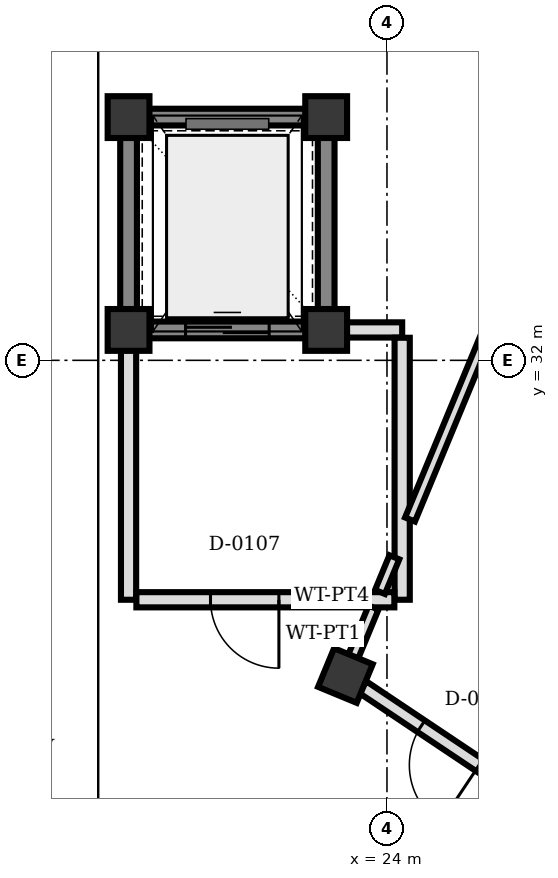
"""IFC4 building model, lengths in metres.
Left out: names, types, materials, properties, quantities, classifications, styles, units other than length and angle.
Written with IfcOpenShell. Run it as: python <this file> out.ifc"""

import sys

from ifc_helpers import new_model, si_unit, direction, frame, frame_2d, origin, origin_2d, place, context, subcontext, project, spatial, rectangle, extrude, element, fill, save


model = new_model("IFC4")
c1 = context("Model", 3, precision=1e-05, world=origin(), true_north=direction((0.0, 1.0)))
c2 = subcontext(c1, "Body", "Model", "MODEL_VIEW")
j1 = project(units=[si_unit("LENGTHUNIT", "METRE"), si_unit("PLANEANGLEUNIT", "RADIAN")], contexts=[c1])
p1 = place(None, origin())
s1 = spatial("IfcSite", under=j1, at=p1, CompositionType="ELEMENT")
p2 = place(p1, origin())
s2 = spatial("IfcBuilding", under=s1, at=p2, CompositionType="ELEMENT")
p3 = place(p2, frame((0.0, 0.0, 8.5)))
s3 = spatial("IfcBuildingStorey", under=s2, at=p3, CompositionType="ELEMENT", Elevation=8.5)
for number, where, z_axis, x_axis in (
    (1, (20.6, 32.4, 0.0), (0.0, 0.0, 1.0), (1.0, 0.0, 0.0)),
    (2, (23.2, 32.4, 0.0), (0.0, 0.0, 1.0), (1.0, 0.0, 0.0)),
    (3, (23.2, 35.2, 0.0), (0.0, 0.0, 1.0), (1.0, 0.0, 0.0)),
    (4, (20.6, 35.2, 0.0), (0.0, 0.0, 1.0), (1.0, 0.0, 0.0)),
    (5, (23.453, 27.853, 0.0), (0.0, 0.0, 1.0), (0.383, 0.924, 0.0)),
):
    element("IfcColumn", number, at=place(p3, frame(where, z_axis=z_axis, x_axis=x_axis)), inside=s3, PredefinedType="COLUMN", context=c2, shape_type="SweptSolid", body=[
        extrude(rectangle(XDim=0.55, YDim=0.55, at=origin_2d()), origin(), (0.0, 0.0, 1.0), 4.0),
    ])
p4 = place(p3, frame((20.867, 32.4, 0.0), z_axis=(0.0, 0.0, 1.0), x_axis=(1.0, 0.0, 0.0)))
e6 = element("IfcWall", 6, at=p4, inside=s3, PredefinedType="SHEAR", context=c2, shape_type="SweptSolid", body=[
    extrude(rectangle(XDim=2.066, YDim=0.22, at=frame_2d((1.033, 0.0))), origin(), (0.0, 0.0, 1.0), 3.74),
])
p5 = place(p4, frame((0.483, 0.0, 0.0)))
e7 = element("IfcOpeningElement", 7, at=p5, cuts=e6, PredefinedType="OPENING", context=c2, shape_type="SweptSolid", body=[
    extrude(rectangle(XDim=1.1, YDim=2.15, at=frame_2d((0.55, 1.075))), frame((0.0, 0.12, 0.0), z_axis=(0.0, -1.0, 0.0), x_axis=(1.0, 0.0, 0.0)), (0.0, 0.0, 1.0), 0.24),
])
p6 = place(p3, frame((23.2, 32.667, 0.0), z_axis=(0.0, 0.0, 1.0), x_axis=(0.0, 1.0, 0.0)))
e8 = element("IfcWall", 8, at=p6, inside=s3, PredefinedType="SHEAR", context=c2, shape_type="SweptSolid", body=[
    extrude(rectangle(XDim=2.266, YDim=0.22, at=frame_2d((1.133, 0.0))), origin(), (0.0, 0.0, 1.0), 3.74),
])
p7 = place(p3, frame((22.933, 35.2, 0.0), z_axis=(0.0, 0.0, 1.0), x_axis=(-1.0, 0.0, 0.0)))
e9 = element("IfcWall", 9, at=p7, inside=s3, PredefinedType="SHEAR", context=c2, shape_type="SweptSolid", body=[
    extrude(rectangle(XDim=2.066, YDim=0.22, at=frame_2d((1.033, 0.0))), origin(), (0.0, 0.0, 1.0), 3.74),
])
p8 = place(p3, frame((20.6, 34.933, 0.0), z_axis=(0.0, 0.0, 1.0), x_axis=(0.0, -1.0, 0.0)))
e10 = element("IfcWall", 10, at=p8, inside=s3, PredefinedType="SHEAR", context=c2, shape_type="SweptSolid", body=[
    extrude(rectangle(XDim=2.266, YDim=0.22, at=frame_2d((1.133, 0.0))), origin(), (0.0, 0.0, 1.0), 3.74),
])
p9 = place(p3, frame((23.467, 32.4, 0.0), z_axis=(0.0, 0.0, 1.0), x_axis=(1.0, 0.0, 0.0)))
e11 = element("IfcWall", 11, at=p9, inside=s3, PredefinedType="PARTITIONING", context=c2, shape_type="SweptSolid", body=[
    extrude(rectangle(XDim=0.733, YDim=0.2, at=frame_2d((0.366, 0.0))), origin(), (0.0, 0.0, 1.0), 3.7),
])
p10 = place(p3, frame((20.6, 28.85, 0.0), z_axis=(0.0, 0.0, 1.0), x_axis=(0.0, 1.0, 0.0)))
e12 = element("IfcWall", 12, at=p10, inside=s3, PredefinedType="PARTITIONING", context=c2, shape_type="SweptSolid", body=[
    extrude(rectangle(XDim=3.283, YDim=0.2, at=frame_2d((1.642, 0.0))), origin(), (0.0, 0.0, 1.0), 3.7),
])
p11 = place(p3, frame((24.2, 28.85, 0.0), z_axis=(0.0, 0.0, 1.0), x_axis=(0.0, 1.0, 0.0)))
e13 = element("IfcWall", 13, at=p11, inside=s3, PredefinedType="PARTITIONING", context=c2, shape_type="SweptSolid", body=[
    extrude(rectangle(XDim=3.447, YDim=0.2, at=frame_2d((1.724, 0.0))), origin(), (0.0, 0.0, 1.0), 3.072),
])
p12 = place(p3, frame((24.097, 28.85, 0.0), z_axis=(0.0, 0.0, 1.0), x_axis=(-1.0, 0.0, 0.0)))
e14 = element("IfcWall", 14, at=p12, inside=s3, PredefinedType="PARTITIONING", context=c2, shape_type="SweptSolid", body=[
    extrude(rectangle(XDim=3.394, YDim=0.2, at=frame_2d((1.697, 0.0))), origin(), (0.0, 0.0, 1.0), 3.072),
])
p13 = place(p12, frame((1.519, 0.0, 0.0)))
e15 = element("IfcOpeningElement", 15, at=p13, cuts=e14, PredefinedType="OPENING", context=c2, shape_type="SweptSolid", body=[
    extrude(rectangle(XDim=0.9, YDim=2.2, at=frame_2d((0.45, 1.1))), frame((0.0, 0.11, 0.0), z_axis=(0.0, -1.0, 0.0), x_axis=(1.0, 0.0, 0.0)), (0.0, 0.0, 1.0), 0.22),
])
p14 = place(p3, frame((23.555, 28.1, 0.0), z_axis=(0.0, 0.0, 1.0), x_axis=(0.38278283439, 0.923838352579, 0.0)))
e16 = element("IfcWall", 16, at=p14, inside=s3, PredefinedType="PARTITIONING", context=c2, shape_type="SweptSolid", body=[
    extrude(rectangle(XDim=0.7, YDim=0.14, at=frame_2d((0.35, 0.0))), origin(), (0.0, 0.0, 1.0), 3.072),
])
p15 = place(p3, frame((23.908, 28.953, 0.0), z_axis=(0.0, 0.0, 1.0), x_axis=(0.3827885685, 0.92383597669, 0.0)))
e17 = element("IfcWall", 17, at=p15, inside=s3, PredefinedType="PARTITIONING", context=c2, shape_type="SweptSolid", body=[
    extrude(rectangle(XDim=0.494, YDim=0.14, at=frame_2d((0.247, 0.0))), origin(), (0.0, 0.0, 1.0), 3.072),
])
p16 = place(p3, frame((24.303, 29.906, 0.0), z_axis=(0.0, 0.0, 1.0), x_axis=(0.382682035927, 0.923880110934, 0.0)))
e18 = element("IfcWall", 18, at=p16, inside=s3, PredefinedType="PARTITIONING", context=c2, shape_type="SweptSolid", body=[
    extrude(rectangle(XDim=6.486, YDim=0.14, at=frame_2d((3.243, 0.0))), origin(), (0.0, 0.0, 1.0), 3.072),
])
p17 = place(p3, frame((25.984, 26.161, 0.0), z_axis=(0.0, 0.0, 1.0), x_axis=(-0.831318045056, 0.555797002478, 0.0)))
e19 = element("IfcWall", 19, at=p17, inside=s3, PredefinedType="PARTITIONING", context=c2, shape_type="SweptSolid", body=[
    extrude(rectangle(XDim=2.773, YDim=0.18, at=frame_2d((1.386, 0.0))), origin(), (0.0, 0.0, 1.0), 3.072),
])
p18 = place(p17, frame((0.926, 0.0, 0.0)))
e20 = element("IfcOpeningElement", 20, at=p18, cuts=e19, PredefinedType="OPENING", context=c2, shape_type="SweptSolid", body=[
    extrude(rectangle(XDim=0.92, YDim=2.1, at=frame_2d((0.46, 1.05))), frame((0.0, 0.1, 0.0), z_axis=(0.0, -1.0, 0.0), x_axis=(1.0, 0.0, 0.0)), (0.0, 0.0, 1.0), 0.2),
])
p19 = place(p5, origin())
e21 = element("IfcDoor", 21, at=p19, inside=s3, OperationType="DOUBLE_DOOR_SLIDING", PredefinedType="DOOR", context=c2, shape_type="SweptSolid", body=[
    extrude(rectangle(XDim=1.1, YDim=2.15, at=frame_2d((0.55, 1.075))), frame((0.0, 0.025, 0.0), z_axis=(0.0, -1.0, 0.0), x_axis=(1.0, 0.0, 0.0)), (0.0, 0.0, 1.0), 0.05),
])
fill(e7, e21)
p20 = place(p13, origin())
e22 = element("IfcDoor", 22, at=p20, inside=s3, OperationType="SINGLE_SWING_LEFT", PredefinedType="DOOR", context=c2, shape_type="SweptSolid", body=[
    extrude(rectangle(XDim=0.9, YDim=2.2, at=frame_2d((0.45, 1.1))), frame((0.0, 0.025, 0.0), z_axis=(0.0, -1.0, 0.0), x_axis=(1.0, 0.0, 0.0)), (0.0, 0.0, 1.0), 0.05),
])
fill(e15, e22)
p21 = place(p18, origin())
e23 = element("IfcDoor", 23, at=p21, inside=s3, OperationType="SINGLE_SWING_LEFT", PredefinedType="DOOR", context=c2, shape_type="SweptSolid", body=[
    extrude(rectangle(XDim=0.92, YDim=2.1, at=frame_2d((0.46, 1.05))), frame((0.0, 0.025, 0.0), z_axis=(0.0, -1.0, 0.0), x_axis=(1.0, 0.0, 0.0)), (0.0, 0.0, 1.0), 0.05),
])
fill(e20, e23)
save(model, sys.argv[1])
